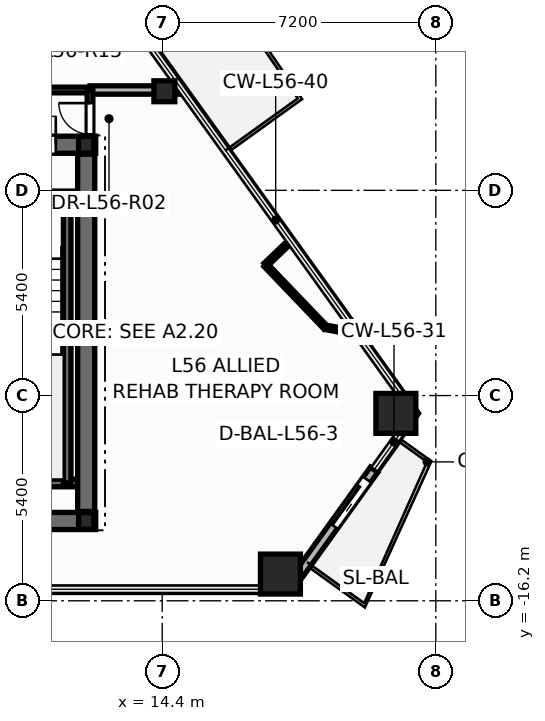
"""IFC4 building model, lengths in metres.
Left out: names, types, materials, properties, quantities, classifications, styles, units other than length and angle.
Written with IfcOpenShell. Run it as: python <this file> out.ifc"""

import sys

from ifc_helpers import new_model, si_unit, direction, frame, frame_2d, origin, origin_2d, place, context, subcontext, project, spatial, rectangle, hollow_rectangle, hollow_circle, i_section, extrude, element, fill, save


model = new_model("IFC4")
c1 = context("Model", 3, precision=1e-05, world=origin(), true_north=direction((0.0, 1.0)))
c2 = subcontext(c1, "Body", "Model", "MODEL_VIEW")
j1 = project(units=[si_unit("LENGTHUNIT", "METRE"), si_unit("PLANEANGLEUNIT", "RADIAN")], contexts=[c1])
p1 = place(None, origin())
s1 = spatial("IfcSite", under=j1, at=p1, CompositionType="ELEMENT")
p2 = place(p1, origin())
s2 = spatial("IfcBuilding", under=s1, at=p2, CompositionType="ELEMENT")
p3 = place(p2, frame((0.0, 0.0, 214.5)))
s3 = spatial("IfcBuildingStorey", under=s2, at=p3, CompositionType="ELEMENT", Elevation=214.5)
for number, where, z_axis, x_axis in (
    (1, (17.511, -15.497, 0.0), (0.0, 0.0, 1.0), (1.0, 0.0, 0.0)),
    (2, (20.548, -11.27, 0.0), (0.0, 0.0, 1.0), (1.0, 0.0, 0.0)),
):
    element("IfcColumn", number, at=place(p3, frame(where, z_axis=z_axis, x_axis=x_axis)), inside=s3, PredefinedType="COLUMN", context=c2, shape_type="SweptSolid", body=[
        extrude(hollow_rectangle(XDim=1.05, YDim=1.05, WallThickness=0.045, at=origin_2d()), origin(), (0.0, 0.0, 1.0), 3.6),
    ])
p4 = place(p3, frame((14.457, -2.793, 0.0), z_axis=(0.0, 0.0, 1.0), x_axis=(1.0, 0.0, 0.0)))
e3 = element("IfcColumn", 3, at=p4, inside=s3, PredefinedType="COLUMN", context=c2, shape_type="SweptSolid", body=[
    extrude(hollow_circle(Radius=0.275, WallThickness=0.024, at=origin_2d()), origin(), (0.0, 0.0, 1.0), 3.6),
])
for number, where, z_axis, x_axis in (
    (4, (12.4, -14.1, 0.0), (0.0, 0.0, 1.0), (1.0, 0.0, 0.0)),
    (5, (12.4, -4.2, 0.0), (0.0, 0.0, 1.0), (1.0, 0.0, 0.0)),
):
    element("IfcColumn", number, at=place(p3, frame(where, z_axis=z_axis, x_axis=x_axis)), inside=s3, PredefinedType="COLUMN", context=c2, shape_type="SweptSolid", body=[
        extrude(i_section(OverallWidth=0.4, OverallDepth=0.44, WebThickness=0.028, FlangeThickness=0.04, at=origin_2d()), origin(), (0.0, 0.0, 1.0), 3.6),
    ])
p5 = place(p3, frame((17.739, -15.864, -0.015), z_axis=(0.0, 0.0, 1.0), x_axis=(0.5835494265, 0.812077623649, 0.0)))
e6 = element("IfcWall", 6, at=p5, inside=s3, PredefinedType="STANDARD", context=c2, shape_type="SweptSolid", body=[
    extrude(rectangle(XDim=3.833, YDim=0.24, at=frame_2d((1.917, 0.0))), origin(), (0.0, 0.0, 1.0), 2.802),
])
p6 = place(p5, frame((2.013, 0.0, 0.015)))
e7 = element("IfcOpeningElement", 7, at=p6, cuts=e6, PredefinedType="OPENING", context=c2, shape_type="SweptSolid", body=[
    extrude(rectangle(XDim=1.506, YDim=2.204, at=frame_2d((0.75, 1.102))), frame((0.0, 0.13, 0.0), z_axis=(0.0, -1.0, 0.0), x_axis=(1.0, 0.0, 0.0)), (0.0, 0.0, 1.0), 0.26),
])
p7 = place(p3, frame((-12.65, -14.1, 0.0), z_axis=(0.0, 0.0, 1.0), x_axis=(1.0, 0.0, 0.0)))
e8 = element("IfcWall", 8, at=p7, inside=s3, PredefinedType="SHEAR", context=c2, shape_type="SweptSolid", body=[
    extrude(rectangle(XDim=25.3, YDim=0.45, at=frame_2d((12.65, 0.0))), origin(), (0.0, 0.0, 1.0), 3.6),
])
p8 = place(p3, frame((-12.65, -4.2, 0.0), z_axis=(0.0, 0.0, 1.0), x_axis=(1.0, 0.0, 0.0)))
e9 = element("IfcWall", 9, at=p8, inside=s3, PredefinedType="SHEAR", context=c2, shape_type="SweptSolid", body=[
    extrude(rectangle(XDim=25.3, YDim=0.45, at=frame_2d((12.65, 0.0))), origin(), (0.0, 0.0, 1.0), 3.6),
])
p9 = place(p8, frame((0.95, 0.0, 0.0)))
e10 = element("IfcOpeningElement", 10, at=p9, cuts=e9, PredefinedType="OPENING", context=c2, shape_type="SweptSolid", body=[
    extrude(rectangle(XDim=0.756, YDim=2.054, at=frame_2d((0.375, 1.027))), frame((0.0, 0.235, 0.0), z_axis=(0.0, -1.0, 0.0), x_axis=(1.0, 0.0, 0.0)), (0.0, 0.0, 1.0), 0.47),
])
p10 = place(p8, frame((2.6, 0.0, 0.0)))
e11 = element("IfcOpeningElement", 11, at=p10, cuts=e9, PredefinedType="OPENING", context=c2, shape_type="SweptSolid", body=[
    extrude(rectangle(XDim=0.756, YDim=2.054, at=frame_2d((0.375, 1.027))), frame((0.0, 0.235, 0.0), z_axis=(0.0, -1.0, 0.0), x_axis=(1.0, 0.0, 0.0)), (0.0, 0.0, 1.0), 0.47),
])
p11 = place(p8, frame((21.85, 0.0, 0.0)))
e12 = element("IfcOpeningElement", 12, at=p11, cuts=e9, PredefinedType="OPENING", context=c2, shape_type="SweptSolid", body=[
    extrude(rectangle(XDim=0.756, YDim=2.054, at=frame_2d((0.375, 1.027))), frame((0.0, 0.235, 0.0), z_axis=(0.0, -1.0, 0.0), x_axis=(1.0, 0.0, 0.0)), (0.0, 0.0, 1.0), 0.47),
])
p12 = place(p8, frame((23.5, 0.0, 0.0)))
e13 = element("IfcOpeningElement", 13, at=p12, cuts=e9, PredefinedType="OPENING", context=c2, shape_type="SweptSolid", body=[
    extrude(rectangle(XDim=0.756, YDim=2.054, at=frame_2d((0.375, 1.027))), frame((0.0, 0.235, 0.0), z_axis=(0.0, -1.0, 0.0), x_axis=(1.0, 0.0, 0.0)), (0.0, 0.0, 1.0), 0.47),
])
p13 = place(p8, frame((5.85, 0.0, 0.0)))
e14 = element("IfcOpeningElement", 14, at=p13, cuts=e9, PredefinedType="OPENING", context=c2, shape_type="SweptSolid", body=[
    extrude(rectangle(XDim=1.006, YDim=2.104, at=frame_2d((0.5, 1.052))), frame((0.0, 0.235, 0.0), z_axis=(0.0, -1.0, 0.0), x_axis=(1.0, 0.0, 0.0)), (0.0, 0.0, 1.0), 0.47),
])
p14 = place(p8, frame((10.35, 0.0, 0.0)))
e15 = element("IfcOpeningElement", 15, at=p14, cuts=e9, PredefinedType="OPENING", context=c2, shape_type="SweptSolid", body=[
    extrude(rectangle(XDim=1.406, YDim=2.154, at=frame_2d((0.7, 1.077))), frame((0.0, 0.235, 0.0), z_axis=(0.0, -1.0, 0.0), x_axis=(1.0, 0.0, 0.0)), (0.0, 0.0, 1.0), 0.47),
])
p15 = place(p8, frame((18.45, 0.0, 0.0)))
e16 = element("IfcOpeningElement", 16, at=p15, cuts=e9, PredefinedType="OPENING", context=c2, shape_type="SweptSolid", body=[
    extrude(rectangle(XDim=1.006, YDim=2.104, at=frame_2d((0.5, 1.052))), frame((0.0, 0.235, 0.0), z_axis=(0.0, -1.0, 0.0), x_axis=(1.0, 0.0, 0.0)), (0.0, 0.0, 1.0), 0.47),
])
for number, where, z_axis, x_axis in (
    (17, (8.48, -5.52, 0.0), (0.0, 0.0, 1.0), (1.0, 0.0, 0.0)),
    (18, (8.48, -13.1, 0.0), (0.0, 0.0, 1.0), (1.0, 0.0, 0.0)),
):
    element("IfcWall", number, at=place(p3, frame(where, z_axis=z_axis, x_axis=x_axis)), inside=s3, PredefinedType="SOLIDWALL", context=c2, shape_type="SweptSolid", body=[
        extrude(rectangle(XDim=3.87, YDim=0.2, at=frame_2d((1.935, 0.0))), origin(), (0.0, 0.0, 1.0), 3.6),
    ])
p16 = place(p3, frame((11.9, -13.1, 0.0), z_axis=(0.0, 0.0, 1.0), x_axis=(0.0, 1.0, 0.0)))
e19 = element("IfcWall", 19, at=p16, inside=s3, PredefinedType="SOLIDWALL", context=c2, shape_type="SweptSolid", body=[
    extrude(rectangle(XDim=7.58, YDim=0.2, at=frame_2d((3.79, 0.0))), origin(), (0.0, 0.0, 1.0), 3.6),
])
p17 = place(p3, frame((12.4, -13.85, 0.0), z_axis=(0.0, 0.0, 1.0), x_axis=(0.0, 1.0, 0.0)))
e20 = element("IfcWall", 20, at=p17, inside=s3, PredefinedType="SHEAR", context=c2, shape_type="SweptSolid", body=[
    extrude(rectangle(XDim=9.4, YDim=0.45, at=frame_2d((4.7, 0.0))), origin(), (0.0, 0.0, 1.0), 3.6),
])
p18 = place(p3, frame((6.34, -2.76, 0.0), z_axis=(0.0, 0.0, 1.0), x_axis=(1.0, 0.0, 0.0)))
e21 = element("IfcWall", 21, at=p18, inside=s3, PredefinedType="PARTITIONING", context=c2, shape_type="SweptSolid", body=[
    extrude(rectangle(XDim=6.16, YDim=0.15, at=frame_2d((3.08, 0.0))), origin(), (0.0, 0.0, 1.0), 2.32),
])
p19 = place(p18, frame((2.426, 0.0, 0.0)))
e22 = element("IfcOpeningElement", 22, at=p19, cuts=e21, PredefinedType="OPENING", context=c2, shape_type="SweptSolid", body=[
    extrude(rectangle(XDim=0.956, YDim=2.104, at=frame_2d((0.475, 1.052))), frame((0.0, 0.085, 0.0), z_axis=(0.0, -1.0, 0.0), x_axis=(1.0, 0.0, 0.0)), (0.0, 0.0, 1.0), 0.17),
])
p20 = place(p3, frame((12.5, -2.76, 0.0), z_axis=(0.0, 0.0, 1.0), x_axis=(1.0, 0.0, 0.0)))
e23 = element("IfcWall", 23, at=p20, inside=s3, PredefinedType="PARTITIONING", context=c2, shape_type="SweptSolid", body=[
    extrude(rectangle(XDim=2.426, YDim=0.22, at=frame_2d((1.213, 0.0))), origin(), (0.0, 0.0, 1.0), 2.32),
])
p21 = place(p3, frame((18.694, -9.004, 0.0), z_axis=(0.0, 0.0, 1.0), x_axis=(-0.691975296368, 0.721921179366, 0.0)))
e24 = element("IfcWall", 24, at=p21, inside=s3, PredefinedType="PARTITIONING", context=c2, shape_type="SweptSolid", body=[
    extrude(rectangle(XDim=2.275, YDim=0.12, at=frame_2d((1.137, 0.0))), origin(), (0.0, 0.0, 1.0), 3.345),
])
p22 = place(p3, frame((12.5, -4.24, 0.0), z_axis=(0.0, 0.0, 1.0), x_axis=(0.0, 1.0, 0.0)))
e25 = element("IfcWall", 25, at=p22, inside=s3, PredefinedType="PARTITIONING", context=c2, shape_type="SweptSolid", body=[
    extrude(rectangle(XDim=1.48, YDim=0.15, at=frame_2d((0.74, 0.0))), origin(), (0.0, 0.0, 1.0), 2.32),
])
p23 = place(p22, frame((0.315, 0.0, 0.0)))
e26 = element("IfcOpeningElement", 26, at=p23, cuts=e25, PredefinedType="OPENING", context=c2, shape_type="SweptSolid", body=[
    extrude(rectangle(XDim=0.826, YDim=2.104, at=frame_2d((0.41, 1.052))), frame((0.0, 0.085, 0.0), z_axis=(0.0, -1.0, 0.0), x_axis=(1.0, 0.0, 0.0)), (0.0, 0.0, 1.0), 0.17),
])
p24 = place(p3, frame((17.12, -7.362, 0.0), z_axis=(0.0, 0.0, 1.0), x_axis=(0.721695363455, 0.692210807751, 0.0)))
e27 = element("IfcWall", 27, at=p24, inside=s3, PredefinedType="PARTITIONING", context=c2, shape_type="SweptSolid", body=[
    extrude(rectangle(XDim=0.903, YDim=0.12, at=frame_2d((0.451, 0.0))), origin(), (0.0, 0.0, 1.0), 2.787),
])
p25 = place(p3, frame((19.507, -9.153, 0.0), z_axis=(0.0, 0.0, 1.0), x_axis=(-0.983694613694, 0.179846898751, 0.0)))
e28 = element("IfcWall", 28, at=p25, inside=s3, PredefinedType="PARTITIONING", context=c2, shape_type="SweptSolid", body=[
    extrude(rectangle(XDim=0.827, YDim=0.12, at=frame_2d((0.413, 0.0))), origin(), (0.0, 0.0, 1.0), 2.787),
])
p26 = place(p6, origin())
e29 = element("IfcDoor", 29, at=p26, inside=s3, OperationType="SLIDING_TO_RIGHT", PredefinedType="DOOR", context=c2, shape_type="SweptSolid", body=[
    extrude(rectangle(XDim=1.5, YDim=2.2, at=frame_2d((0.75, 1.1))), frame((0.0, 0.025, 0.0), z_axis=(0.0, -1.0, 0.0), x_axis=(1.0, 0.0, 0.0)), (0.0, 0.0, 1.0), 0.05),
])
fill(e7, e29)
p27 = place(p12, origin())
e30 = element("IfcDoor", 30, at=p27, inside=s3, OperationType="SINGLE_SWING_RIGHT", PredefinedType="DOOR", context=c2, shape_type="SweptSolid", body=[
    extrude(rectangle(XDim=0.75, YDim=2.05, at=frame_2d((0.375, 1.025))), frame((0.0, 0.025, 0.0), z_axis=(0.0, -1.0, 0.0), x_axis=(1.0, 0.0, 0.0)), (0.0, 0.0, 1.0), 0.05),
])
fill(e13, e30)
p28 = place(p23, origin())
e31 = element("IfcDoor", 31, at=p28, inside=s3, OperationType="SINGLE_SWING_RIGHT", PredefinedType="DOOR", context=c2, shape_type="SweptSolid", body=[
    extrude(rectangle(XDim=0.82, YDim=2.1, at=frame_2d((0.41, 1.05))), frame((0.0, 0.025, 0.0), z_axis=(0.0, -1.0, 0.0), x_axis=(1.0, 0.0, 0.0)), (0.0, 0.0, 1.0), 0.05),
])
fill(e26, e31)
save(model, sys.argv[1])
